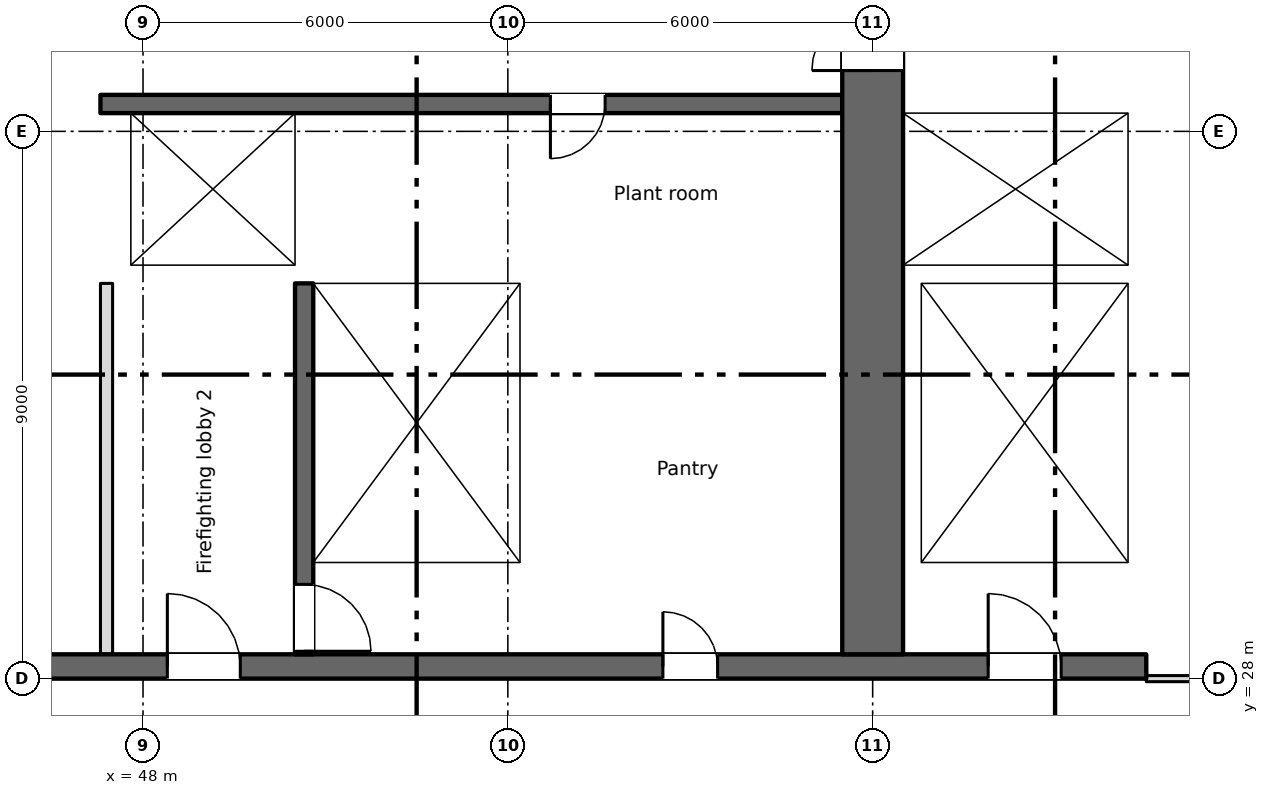
"""IFC4 building model, lengths in metres.
Left out: names, types, materials, properties, quantities, classifications, styles, units other than length and angle.
Written with IfcOpenShell. Run it as: python <this file> out.ifc"""

import sys

from ifc_helpers import new_model, si_unit, direction, frame, frame_2d, origin, place, context, subcontext, project, spatial, rectangle, extrude, element, fill, save


model = new_model("IFC4")
c1 = context("Model", 3, precision=1e-05, world=origin(), true_north=direction((0.0, 1.0)))
c2 = subcontext(c1, "Body", "Model", "MODEL_VIEW")
j1 = project(units=[si_unit("LENGTHUNIT", "METRE"), si_unit("PLANEANGLEUNIT", "RADIAN")], contexts=[c1])
p1 = place(None, origin())
s1 = spatial("IfcSite", under=j1, at=p1, CompositionType="ELEMENT")
p2 = place(p1, origin())
s2 = spatial("IfcBuilding", under=s1, at=p2, CompositionType="ELEMENT")
p3 = place(p2, frame((0.0, 0.0, 63.75)))
s3 = spatial("IfcBuildingStorey", under=s2, at=p3, CompositionType="ELEMENT", Elevation=63.75)
p4 = place(p3, frame((6.7, 28.2, 0.0), z_axis=(0.0, 0.0, 1.0), x_axis=(1.0, 0.0, 0.0)))
e1 = element("IfcWall", 1, at=p4, inside=s3, PredefinedType="SHEAR", context=c2, shape_type="SweptSolid", body=[
    extrude(rectangle(XDim=57.8, YDim=0.4, at=frame_2d((28.9, 0.0))), origin(), (0.0, 0.0, 1.0), 3.35),
])
p5 = place(p4, frame((12.562, 0.0, 0.0)))
e2 = element("IfcOpeningElement", 2, at=p5, cuts=e1, PredefinedType="OPENING", context=c2, shape_type="SweptSolid", body=[
    extrude(rectangle(XDim=0.9, YDim=2.1, at=frame_2d((0.45, 1.05))), frame((0.0, 0.21, 0.0), z_axis=(0.0, -1.0, 0.0), x_axis=(1.0, 0.0, 0.0)), (0.0, 0.0, 1.0), 0.42),
])
p6 = place(p4, frame((15.137, 0.0, 0.0)))
e3 = element("IfcOpeningElement", 3, at=p6, cuts=e1, PredefinedType="OPENING", context=c2, shape_type="SweptSolid", body=[
    extrude(rectangle(XDim=0.9, YDim=2.1, at=frame_2d((0.45, 1.05))), frame((0.0, 0.21, 0.0), z_axis=(0.0, -1.0, 0.0), x_axis=(1.0, 0.0, 0.0)), (0.0, 0.0, 1.0), 0.42),
])
p7 = place(p4, frame((49.85, 0.0, 0.0)))
e4 = element("IfcOpeningElement", 4, at=p7, cuts=e1, PredefinedType="OPENING", context=c2, shape_type="SweptSolid", body=[
    extrude(rectangle(XDim=0.9, YDim=2.1, at=frame_2d((0.45, 1.05))), frame((0.0, 0.21, 0.0), z_axis=(0.0, -1.0, 0.0), x_axis=(1.0, 0.0, 0.0)), (0.0, 0.0, 1.0), 0.42),
])
p8 = place(p4, frame((0.562, 0.0, 0.0)))
e5 = element("IfcOpeningElement", 5, at=p8, cuts=e1, PredefinedType="OPENING", context=c2, shape_type="SweptSolid", body=[
    extrude(rectangle(XDim=0.9, YDim=2.1, at=frame_2d((0.45, 1.05))), frame((0.0, 0.21, 0.0), z_axis=(0.0, -1.0, 0.0), x_axis=(1.0, 0.0, 0.0)), (0.0, 0.0, 1.0), 0.42),
])
p9 = place(p4, frame((2.137, 0.0, 0.0)))
e6 = element("IfcOpeningElement", 6, at=p9, cuts=e1, PredefinedType="OPENING", context=c2, shape_type="SweptSolid", body=[
    extrude(rectangle(XDim=0.9, YDim=2.1, at=frame_2d((0.45, 1.05))), frame((0.0, 0.21, 0.0), z_axis=(0.0, -1.0, 0.0), x_axis=(1.0, 0.0, 0.0)), (0.0, 0.0, 1.0), 0.42),
])
p10 = place(p4, frame((4.7, 0.0, 0.0)))
e7 = element("IfcOpeningElement", 7, at=p10, cuts=e1, PredefinedType="OPENING", context=c2, shape_type="SweptSolid", body=[
    extrude(rectangle(XDim=1.2, YDim=2.1, at=frame_2d((0.6, 1.05))), frame((0.0, 0.21, 0.0), z_axis=(0.0, -1.0, 0.0), x_axis=(1.0, 0.0, 0.0)), (0.0, 0.0, 1.0), 0.42),
])
p11 = place(p4, frame((31.7, 0.0, 0.0)))
e8 = element("IfcOpeningElement", 8, at=p11, cuts=e1, PredefinedType="OPENING", context=c2, shape_type="SweptSolid", body=[
    extrude(rectangle(XDim=1.2, YDim=2.1, at=frame_2d((0.6, 1.05))), frame((0.0, 0.21, 0.0), z_axis=(0.0, -1.0, 0.0), x_axis=(1.0, 0.0, 0.0)), (0.0, 0.0, 1.0), 0.42),
])
p12 = place(p4, frame((55.2, 0.0, 0.0)))
e9 = element("IfcOpeningElement", 9, at=p12, cuts=e1, PredefinedType="OPENING", context=c2, shape_type="SweptSolid", body=[
    extrude(rectangle(XDim=1.2, YDim=2.1, at=frame_2d((0.6, 1.05))), frame((0.0, 0.21, 0.0), z_axis=(0.0, -1.0, 0.0), x_axis=(1.0, 0.0, 0.0)), (0.0, 0.0, 1.0), 0.42),
])
p13 = place(p4, frame((21.7, 0.0, 0.0)))
e10 = element("IfcOpeningElement", 10, at=p13, cuts=e1, PredefinedType="OPENING", context=c2, shape_type="SweptSolid", body=[
    extrude(rectangle(XDim=1.2, YDim=2.1, at=frame_2d((0.6, 1.05))), frame((0.0, 0.21, 0.0), z_axis=(0.0, -1.0, 0.0), x_axis=(1.0, 0.0, 0.0)), (0.0, 0.0, 1.0), 0.42),
])
p14 = place(p4, frame((41.7, 0.0, 0.0)))
e11 = element("IfcOpeningElement", 11, at=p14, cuts=e1, PredefinedType="OPENING", context=c2, shape_type="SweptSolid", body=[
    extrude(rectangle(XDim=1.2, YDim=2.1, at=frame_2d((0.6, 1.05))), frame((0.0, 0.21, 0.0), z_axis=(0.0, -1.0, 0.0), x_axis=(1.0, 0.0, 0.0)), (0.0, 0.0, 1.0), 0.42),
])
p15 = place(p4, frame((24.85, 0.0, 0.0)))
e12 = element("IfcOpeningElement", 12, at=p15, cuts=e1, PredefinedType="OPENING", context=c2, shape_type="SweptSolid", body=[
    extrude(rectangle(XDim=2.4, YDim=2.1, at=frame_2d((1.2, 1.05))), frame((0.0, 0.21, 0.0), z_axis=(0.0, -1.0, 0.0), x_axis=(1.0, 0.0, 0.0)), (0.0, 0.0, 1.0), 0.42),
])
p16 = place(p4, frame((37.35, 0.0, 0.0)))
e13 = element("IfcOpeningElement", 13, at=p16, cuts=e1, PredefinedType="OPENING", context=c2, shape_type="SweptSolid", body=[
    extrude(rectangle(XDim=2.4, YDim=2.1, at=frame_2d((1.2, 1.05))), frame((0.0, 0.21, 0.0), z_axis=(0.0, -1.0, 0.0), x_axis=(1.0, 0.0, 0.0)), (0.0, 0.0, 1.0), 0.42),
])
p17 = place(p4, frame((7.85, 0.0, 0.0)))
e14 = element("IfcOpeningElement", 14, at=p17, cuts=e1, PredefinedType="OPENING", context=c2, shape_type="SweptSolid", body=[
    extrude(rectangle(XDim=2.4, YDim=2.1, at=frame_2d((1.2, 1.05))), frame((0.0, 0.21, 0.0), z_axis=(0.0, -1.0, 0.0), x_axis=(1.0, 0.0, 0.0)), (0.0, 0.0, 1.0), 0.42),
])
p18 = place(p4, frame((28.85, 0.0, 0.0)))
e15 = element("IfcOpeningElement", 15, at=p18, cuts=e1, PredefinedType="OPENING", context=c2, shape_type="SweptSolid", body=[
    extrude(rectangle(XDim=0.9, YDim=2.1, at=frame_2d((0.45, 1.05))), frame((0.0, 0.21, 0.0), z_axis=(0.0, -1.0, 0.0), x_axis=(1.0, 0.0, 0.0)), (0.0, 0.0, 1.0), 0.42),
])
p19 = place(p4, frame((34.85, 0.0, 0.0)))
e16 = element("IfcOpeningElement", 16, at=p19, cuts=e1, PredefinedType="OPENING", context=c2, shape_type="SweptSolid", body=[
    extrude(rectangle(XDim=0.9, YDim=2.1, at=frame_2d((0.45, 1.05))), frame((0.0, 0.21, 0.0), z_axis=(0.0, -1.0, 0.0), x_axis=(1.0, 0.0, 0.0)), (0.0, 0.0, 1.0), 0.42),
])
p20 = place(p3, frame((64.35, 34.8, 0.0), z_axis=(0.0, 0.0, 1.0), x_axis=(0.0, 1.0, 0.0)))
e17 = element("IfcWall", 17, at=p20, inside=s3, PredefinedType="SHEAR", context=c2, shape_type="SweptSolid", body=[
    extrude(rectangle(XDim=10.2, YDim=0.3, at=frame_2d((5.1, 0.0))), origin(), (0.0, 0.0, 1.0), 3.35),
])
p21 = place(p3, frame((60.0, 28.4, 0.0), z_axis=(0.0, 0.0, 1.0), x_axis=(0.0, 1.0, 0.0)))
e18 = element("IfcWall", 18, at=p21, inside=s3, PredefinedType="SHEAR", context=c2, shape_type="SweptSolid", body=[
    extrude(rectangle(XDim=16.6, YDim=1.0, at=frame_2d((8.3, 0.0))), origin(), (0.0, 0.0, 1.0), 3.35),
])
p22 = place(p21, frame((9.6, 0.0, 0.0)))
e19 = element("IfcOpeningElement", 19, at=p22, cuts=e18, PredefinedType="OPENING", context=c2, shape_type="SweptSolid", body=[
    extrude(rectangle(XDim=2.0, YDim=2.1, at=frame_2d((1.0, 1.05))), frame((0.0, 0.51, 0.0), z_axis=(0.0, -1.0, 0.0), x_axis=(1.0, 0.0, 0.0)), (0.0, 0.0, 1.0), 1.02),
])
p23 = place(p21, frame((15.25, 0.0, 0.0)))
e20 = element("IfcOpeningElement", 20, at=p23, cuts=e18, PredefinedType="OPENING", context=c2, shape_type="SweptSolid", body=[
    extrude(rectangle(XDim=1.2, YDim=2.1, at=frame_2d((0.6, 1.05))), frame((0.0, 0.51, 0.0), z_axis=(0.0, -1.0, 0.0), x_axis=(1.0, 0.0, 0.0)), (0.0, 0.0, 1.0), 1.02),
])
p24 = place(p3, frame((50.65, 34.5, 0.0), z_axis=(0.0, 0.0, 1.0), x_axis=(0.0, -1.0, 0.0)))
e21 = element("IfcWall", 21, at=p24, inside=s3, PredefinedType="SHEAR", context=c2, shape_type="SweptSolid", body=[
    extrude(rectangle(XDim=6.1, YDim=0.3, at=frame_2d((3.05, 0.0))), origin(), (0.0, 0.0, 1.0), 3.35),
])
p25 = place(p24, frame((4.95, 0.0, 0.0)))
e22 = element("IfcOpeningElement", 22, at=p25, cuts=e21, PredefinedType="OPENING", context=c2, shape_type="SweptSolid", body=[
    extrude(rectangle(XDim=1.1, YDim=2.1, at=frame_2d((0.55, 1.05))), frame((0.0, 0.16, 0.0), z_axis=(0.0, -1.0, 0.0), x_axis=(1.0, 0.0, 0.0)), (0.0, 0.0, 1.0), 0.32),
])
for number, where, z_axis, x_axis in (
    (23, (54.35, 28.4, 0.0), (0.0, 0.0, 1.0), (0.0, 1.0, 0.0)),
    (24, (60.65, 28.4, 0.0), (0.0, 0.0, 1.0), (0.0, 1.0, 0.0)),
    (25, (64.35, 28.4, 0.0), (0.0, 0.0, 1.0), (0.0, 1.0, 0.0)),
):
    element("IfcWall", number, at=place(p3, frame(where, z_axis=z_axis, x_axis=x_axis)), inside=s3, PredefinedType="SHEAR", context=c2, shape_type="SweptSolid", body=[
        extrude(rectangle(XDim=6.1, YDim=0.3, at=frame_2d((3.05, 0.0))), origin(), (0.0, 0.0, 1.0), 3.35),
    ])
p26 = place(p3, frame((47.3, 34.65, 0.0), z_axis=(0.0, 0.0, 1.0), x_axis=(1.0, 0.0, 0.0)))
e26 = element("IfcWall", 26, at=p26, inside=s3, PredefinedType="SHEAR", context=c2, shape_type="SweptSolid", body=[
    extrude(rectangle(XDim=12.2, YDim=0.3, at=frame_2d((6.1, 0.0))), origin(), (0.0, 0.0, 1.0), 3.35),
])
p27 = place(p26, frame((1.3, 0.0, 0.0)))
e27 = element("IfcOpeningElement", 27, at=p27, cuts=e26, PredefinedType="OPENING", context=c2, shape_type="SweptSolid", body=[
    extrude(rectangle(XDim=1.1, YDim=2.1, at=frame_2d((0.55, 1.05))), frame((0.0, 0.16, 0.0), z_axis=(0.0, -1.0, 0.0), x_axis=(1.0, 0.0, 0.0)), (0.0, 0.0, 1.0), 0.32),
])
p28 = place(p3, frame((60.5, 34.65, 0.0), z_axis=(0.0, 0.0, 1.0), x_axis=(1.0, 0.0, 0.0)))
e28 = element("IfcWall", 28, at=p28, inside=s3, PredefinedType="SHEAR", context=c2, shape_type="SweptSolid", body=[
    extrude(rectangle(XDim=4.0, YDim=0.3, at=frame_2d((2.0, 0.0))), origin(), (0.0, 0.0, 1.0), 3.35),
])
p29 = place(p3, frame((59.5, 37.45, 0.0), z_axis=(0.0, 0.0, 1.0), x_axis=(-1.0, 0.0, 0.0)))
e29 = element("IfcWall", 29, at=p29, inside=s3, PredefinedType="SHEAR", context=c2, shape_type="SweptSolid", body=[
    extrude(rectangle(XDim=12.2, YDim=0.3, at=frame_2d((6.1, 0.0))), origin(), (0.0, 0.0, 1.0), 3.35),
])
p30 = place(p29, frame((3.9, 0.0, 0.0)))
e30 = element("IfcOpeningElement", 30, at=p30, cuts=e29, PredefinedType="OPENING", context=c2, shape_type="SweptSolid", body=[
    extrude(rectangle(XDim=0.9, YDim=2.1, at=frame_2d((0.45, 1.05))), frame((0.0, 0.16, 0.0), z_axis=(0.0, -1.0, 0.0), x_axis=(1.0, 0.0, 0.0)), (0.0, 0.0, 1.0), 0.32),
])
p31 = place(p3, frame((60.5, 37.45, 0.0), z_axis=(0.0, 0.0, 1.0), x_axis=(1.0, 0.0, 0.0)))
e31 = element("IfcWall", 31, at=p31, inside=s3, PredefinedType="SHEAR", context=c2, shape_type="SweptSolid", body=[
    extrude(rectangle(XDim=3.7, YDim=0.3, at=frame_2d((1.85, 0.0))), origin(), (0.0, 0.0, 1.0), 3.35),
])
p32 = place(p31, frame((1.3, 0.0, 0.0)))
e32 = element("IfcOpeningElement", 32, at=p32, cuts=e31, PredefinedType="OPENING", context=c2, shape_type="SweptSolid", body=[
    extrude(rectangle(XDim=1.1, YDim=2.1, at=frame_2d((0.55, 1.05))), frame((0.0, 0.16, 0.0), z_axis=(0.0, -1.0, 0.0), x_axis=(1.0, 0.0, 0.0)), (0.0, 0.0, 1.0), 0.32),
])
p33 = place(p3, frame((47.55, 34.8, 0.0), z_axis=(0.0, 0.0, 1.0), x_axis=(0.0, 1.0, 0.0)))
e33 = element("IfcWall", 33, at=p33, inside=s3, PredefinedType="SHEAR", context=c2, shape_type="SweptSolid", body=[
    extrude(rectangle(XDim=2.5, YDim=0.5, at=frame_2d((1.25, 0.0))), origin(), (0.0, 0.0, 1.0), 3.35),
])
p34 = place(p3, frame((50.65, 34.8, 0.0), z_axis=(0.0, 0.0, 1.0), x_axis=(0.0, 1.0, 0.0)))
e34 = element("IfcWall", 34, at=p34, inside=s3, PredefinedType="SHEAR", context=c2, shape_type="SweptSolid", body=[
    extrude(rectangle(XDim=2.5, YDim=0.3, at=frame_2d((1.25, 0.0))), origin(), (0.0, 0.0, 1.0), 3.35),
])
p35 = place(p3, frame((47.4, 28.4, 0.0), z_axis=(0.0, 0.0, 1.0), x_axis=(0.0, 1.0, 0.0)))
e35 = element("IfcWall", 35, at=p35, inside=s3, PredefinedType="PARTITIONING", context=c2, shape_type="SweptSolid", body=[
    extrude(rectangle(XDim=6.1, YDim=0.2, at=frame_2d((3.05, 0.0))), origin(), (0.0, 0.0, 1.0), 3.35),
])
p36 = place(p3, frame((64.5, 28.0, 0.0), z_axis=(0.0, 0.0, 1.0), x_axis=(1.0, 0.0, 0.0)))
e36 = element("IfcWall", 36, at=p36, inside=s3, PredefinedType="PARTITIONING", context=c2, shape_type="SweptSolid", body=[
    extrude(rectangle(XDim=12.7, YDim=0.1, at=frame_2d((6.35, 0.0))), origin(), (0.0, 0.0, 1.0), 3.35),
])
p37 = place(p36, frame((2.575, 0.0, 0.0)))
e37 = element("IfcOpeningElement", 37, at=p37, cuts=e36, PredefinedType="OPENING", context=c2, shape_type="SweptSolid", body=[
    extrude(rectangle(XDim=1.2, YDim=2.1, at=frame_2d((0.6, 1.05))), frame((0.0, 0.06, 0.0), z_axis=(0.0, -1.0, 0.0), x_axis=(1.0, 0.0, 0.0)), (0.0, 0.0, 1.0), 0.12),
])
p38 = place(p36, frame((8.925, 0.0, 0.0)))
e38 = element("IfcOpeningElement", 38, at=p38, cuts=e36, PredefinedType="OPENING", context=c2, shape_type="SweptSolid", body=[
    extrude(rectangle(XDim=1.2, YDim=2.1, at=frame_2d((0.6, 1.05))), frame((0.0, 0.06, 0.0), z_axis=(0.0, -1.0, 0.0), x_axis=(1.0, 0.0, 0.0)), (0.0, 0.0, 1.0), 0.12),
])
p39 = place(p7, origin())
e39 = element("IfcDoor", 39, at=p39, inside=s3, OperationType="SINGLE_SWING_LEFT", PredefinedType="DOOR", context=c2, shape_type="SweptSolid", body=[
    extrude(rectangle(XDim=0.9, YDim=2.1, at=frame_2d((0.45, 1.05))), frame((0.0, 0.025, 0.0), z_axis=(0.0, -1.0, 0.0), x_axis=(1.0, 0.0, 0.0)), (0.0, 0.0, 1.0), 0.05),
])
fill(e4, e39)
p40 = place(p30, origin())
e40 = element("IfcDoor", 40, at=p40, inside=s3, OperationType="SINGLE_SWING_RIGHT", PredefinedType="DOOR", context=c2, shape_type="SweptSolid", body=[
    extrude(rectangle(XDim=0.9, YDim=2.1, at=frame_2d((0.45, 1.05))), frame((0.0, 0.025, 0.0), z_axis=(0.0, -1.0, 0.0), x_axis=(1.0, 0.0, 0.0)), (0.0, 0.0, 1.0), 0.05),
])
fill(e30, e40)
p41 = place(p32, origin())
e41 = element("IfcDoor", 41, at=p41, inside=s3, OperationType="SLIDING_TO_LEFT", PredefinedType="DOOR", context=c2, shape_type="SweptSolid", body=[
    extrude(rectangle(XDim=1.1, YDim=2.1, at=frame_2d((0.55, 1.05))), frame((0.0, 0.025, 0.0), z_axis=(0.0, -1.0, 0.0), x_axis=(1.0, 0.0, 0.0)), (0.0, 0.0, 1.0), 0.05),
])
fill(e32, e41)
p42 = place(p27, origin())
e42 = element("IfcDoor", 42, at=p42, inside=s3, OperationType="SLIDING_TO_LEFT", PredefinedType="DOOR", context=c2, shape_type="SweptSolid", body=[
    extrude(rectangle(XDim=1.1, YDim=2.1, at=frame_2d((0.55, 1.05))), frame((0.0, 0.025, 0.0), z_axis=(0.0, -1.0, 0.0), x_axis=(1.0, 0.0, 0.0)), (0.0, 0.0, 1.0), 0.05),
])
fill(e27, e42)
p43 = place(p25, origin())
e43 = element("IfcDoor", 43, at=p43, inside=s3, OperationType="SINGLE_SWING_RIGHT", PredefinedType="DOOR", context=c2, shape_type="SweptSolid", body=[
    extrude(rectangle(XDim=1.1, YDim=2.1, at=frame_2d((0.55, 1.05))), frame((0.0, 0.025, 0.0), z_axis=(0.0, -1.0, 0.0), x_axis=(1.0, 0.0, 0.0)), (0.0, 0.0, 1.0), 0.05),
])
fill(e22, e43)
p44 = place(p12, origin())
e44 = element("IfcDoor", 44, at=p44, inside=s3, OperationType="SINGLE_SWING_LEFT", PredefinedType="DOOR", context=c2, shape_type="SweptSolid", body=[
    extrude(rectangle(XDim=1.2, YDim=2.1, at=frame_2d((0.6, 1.05))), frame((0.0, 0.025, 0.0), z_axis=(0.0, -1.0, 0.0), x_axis=(1.0, 0.0, 0.0)), (0.0, 0.0, 1.0), 0.05),
])
fill(e9, e44)
p45 = place(p14, origin())
e45 = element("IfcDoor", 45, at=p45, inside=s3, OperationType="SINGLE_SWING_LEFT", PredefinedType="DOOR", context=c2, shape_type="SweptSolid", body=[
    extrude(rectangle(XDim=1.2, YDim=2.1, at=frame_2d((0.6, 1.05))), frame((0.0, 0.025, 0.0), z_axis=(0.0, -1.0, 0.0), x_axis=(1.0, 0.0, 0.0)), (0.0, 0.0, 1.0), 0.05),
])
fill(e11, e45)
p46 = place(p22, origin())
e46 = element("IfcDoor", 46, at=p46, inside=s3, OperationType="DOUBLE_DOOR_SINGLE_SWING", PredefinedType="DOOR", context=c2, shape_type="SweptSolid", body=[
    extrude(rectangle(XDim=2.0, YDim=2.1, at=frame_2d((1.0, 1.05))), frame((0.0, 0.025, 0.0), z_axis=(0.0, -1.0, 0.0), x_axis=(1.0, 0.0, 0.0)), (0.0, 0.0, 1.0), 0.05),
])
fill(e19, e46)
save(model, sys.argv[1])
